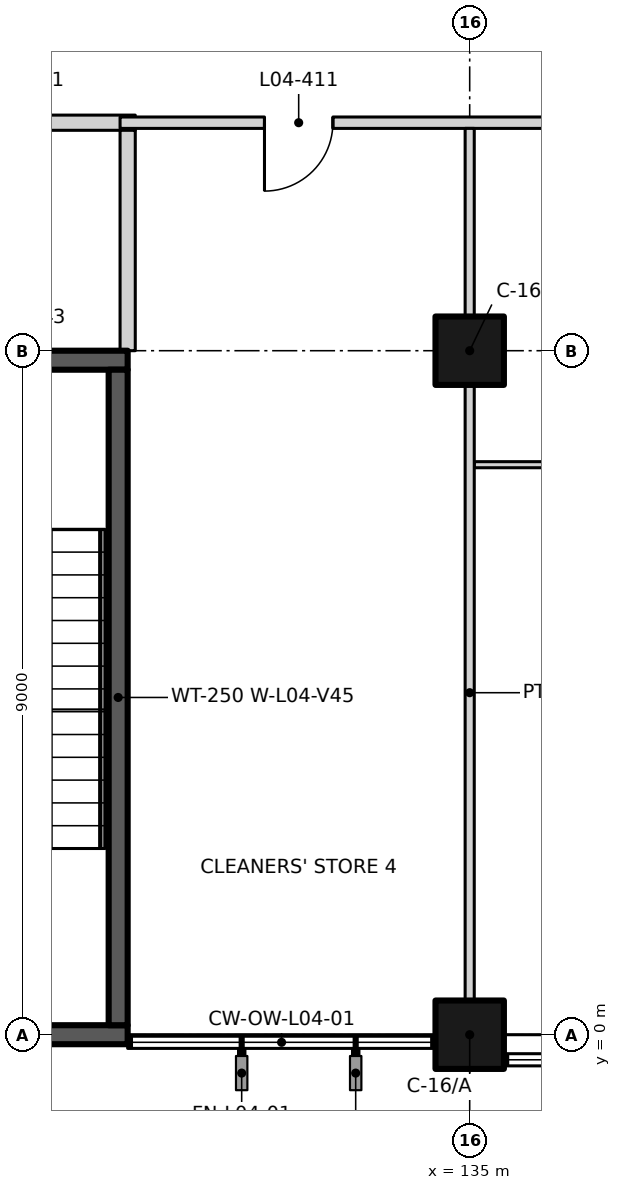
"""IFC4 building model, lengths in metres.
Left out: names, types, materials, properties, quantities, classifications, styles, units other than length and angle.
Written with IfcOpenShell. Run it as: python <this file> out.ifc"""

import sys

from ifc_helpers import new_model, si_unit, direction, frame, frame_2d, origin, origin_2d, place, context, subcontext, project, spatial, rectangle, extrude, element, fill, save


model = new_model("IFC4")
c1 = context("Model", 3, precision=1e-05, world=origin(), true_north=direction((0.0, 1.0)))
c2 = subcontext(c1, "Body", "Model", "MODEL_VIEW")
j1 = project(units=[si_unit("LENGTHUNIT", "METRE"), si_unit("PLANEANGLEUNIT", "RADIAN")], contexts=[c1])
p1 = place(None, origin())
s1 = spatial("IfcSite", under=j1, at=p1, CompositionType="ELEMENT")
p2 = place(p1, origin())
s2 = spatial("IfcBuilding", under=s1, at=p2, CompositionType="ELEMENT")
p3 = place(p2, frame((0.0, 0.0, 19.5)))
s3 = spatial("IfcBuildingStorey", under=s2, at=p3, CompositionType="ELEMENT", Elevation=19.5)
for number, where, z_axis, x_axis in (
    (1, (135.0, 0.0, 0.0), (0.0, 0.0, 1.0), (1.0, 0.0, 0.0)),
    (2, (135.0, 9.0, 0.0), (0.0, 0.0, 1.0), (1.0, 0.0, 0.0)),
):
    element("IfcColumn", number, at=place(p3, frame(where, z_axis=z_axis, x_axis=x_axis)), inside=s3, PredefinedType="COLUMN", context=c2, shape_type="SweptSolid", body=[
        extrude(rectangle(XDim=0.9, YDim=0.9, at=origin_2d()), origin(), (0.0, 0.0, 1.0), 4.5),
    ])
p4 = place(p3, frame((128.188, 0.0, 0.0), z_axis=(0.0, 0.0, 1.0), x_axis=(1.0, 0.0, 0.0)))
e3 = element("IfcWall", 3, at=p4, inside=s3, PredefinedType="SHEAR", context=c2, shape_type="SweptSolid", body=[
    extrude(rectangle(XDim=2.312, YDim=0.25, at=frame_2d((1.156, 0.0))), origin(), (0.0, 0.0, 1.0), 4.5),
])
p5 = place(p3, frame((126.45, 8.875, 0.0), z_axis=(0.0, 0.0, 1.0), x_axis=(1.0, 0.0, 0.0)))
e4 = element("IfcWall", 4, at=p5, inside=s3, PredefinedType="SHEAR", context=c2, shape_type="SweptSolid", body=[
    extrude(rectangle(XDim=4.05, YDim=0.25, at=frame_2d((2.025, 0.0))), origin(), (0.0, 0.0, 1.0), 4.5),
])
p6 = place(p5, frame((2.35, 0.0, 0.0), z_axis=(0.0, 0.0, 1.0), x_axis=(-1.0, 0.0, 0.0)))
e5 = element("IfcOpeningElement", 5, at=p6, cuts=e4, PredefinedType="OPENING", context=c2, shape_type="SweptSolid", body=[
    extrude(rectangle(XDim=1.1, YDim=2.1, at=frame_2d((0.55, 1.05))), frame((0.0, 0.135, 0.0), z_axis=(0.0, -1.0, 0.0), x_axis=(1.0, 0.0, 0.0)), (0.0, 0.0, 1.0), 0.27),
])
p7 = place(p3, frame((130.375, 0.125, 0.0), z_axis=(0.0, 0.0, 1.0), x_axis=(0.0, 1.0, 0.0)))
e6 = element("IfcWall", 6, at=p7, inside=s3, PredefinedType="SHEAR", context=c2, shape_type="SweptSolid", body=[
    extrude(rectangle(XDim=8.625, YDim=0.25, at=frame_2d((4.312, 0.0))), origin(), (0.0, 0.0, 1.0), 4.5),
])
p8 = place(p3, frame((135.06, 7.5, 0.0), z_axis=(0.0, 0.0, 1.0), x_axis=(1.0, 0.0, 0.0)))
e7 = element("IfcWall", 7, at=p8, inside=s3, PredefinedType="PARTITIONING", context=c2, shape_type="SweptSolid", body=[
    extrude(rectangle(XDim=8.88, YDim=0.08, at=frame_2d((4.44, 0.0))), origin(), (0.0, 0.0, 1.0), 4.2),
])
p9 = place(p8, frame((4.64, 0.0, 0.0), z_axis=(0.0, 0.0, 1.0), x_axis=(-1.0, 0.0, 0.0)))
e8 = element("IfcOpeningElement", 8, at=p9, cuts=e7, PredefinedType="OPENING", context=c2, shape_type="SweptSolid", body=[
    extrude(rectangle(XDim=0.9, YDim=2.1, at=frame_2d((0.45, 1.05))), frame((0.0, 0.05, 0.0), z_axis=(0.0, -1.0, 0.0), x_axis=(1.0, 0.0, 0.0)), (0.0, 0.0, 1.0), 0.1),
])
p10 = place(p8, frame((7.89, 0.0, 0.0), z_axis=(0.0, 0.0, 1.0), x_axis=(-1.0, 0.0, 0.0)))
e9 = element("IfcOpeningElement", 9, at=p10, cuts=e7, PredefinedType="OPENING", context=c2, shape_type="SweptSolid", body=[
    extrude(rectangle(XDim=0.9, YDim=2.1, at=frame_2d((0.45, 1.05))), frame((0.0, 0.05, 0.0), z_axis=(0.0, -1.0, 0.0), x_axis=(1.0, 0.0, 0.0)), (0.0, 0.0, 1.0), 0.1),
])
p11 = place(p3, frame((126.25, 12.0, 0.0), z_axis=(0.0, 0.0, 1.0), x_axis=(1.0, 0.0, 0.0)))
e10 = element("IfcWall", 10, at=p11, inside=s3, PredefinedType="PARTITIONING", context=c2, shape_type="SweptSolid", body=[
    extrude(rectangle(XDim=4.35, YDim=0.2, at=frame_2d((2.175, 0.0))), origin(), (0.0, 0.0, 1.0), 4.2),
])
p12 = place(p11, frame((2.6, 0.0, 0.0), z_axis=(0.0, 0.0, 1.0), x_axis=(-1.0, 0.0, 0.0)))
e11 = element("IfcOpeningElement", 11, at=p12, cuts=e10, PredefinedType="OPENING", context=c2, shape_type="SweptSolid", body=[
    extrude(rectangle(XDim=1.2, YDim=2.1, at=frame_2d((0.6, 1.05))), frame((0.0, 0.11, 0.0), z_axis=(0.0, -1.0, 0.0), x_axis=(1.0, 0.0, 0.0)), (0.0, 0.0, 1.0), 0.22),
])
p13 = place(p3, frame((130.4, 12.0, 0.0), z_axis=(0.0, 0.0, 1.0), x_axis=(1.0, 0.0, 0.0)))
e12 = element("IfcWall", 12, at=p13, inside=s3, PredefinedType="PARTITIONING", context=c2, shape_type="SweptSolid", body=[
    extrude(rectangle(XDim=13.6, YDim=0.15, at=frame_2d((6.8, 0.0))), origin(), (0.0, 0.0, 1.0), 4.2),
])
p14 = place(p13, frame((10.85, 0.0, 0.0), z_axis=(0.0, 0.0, 1.0), x_axis=(-1.0, 0.0, 0.0)))
e13 = element("IfcOpeningElement", 13, at=p14, cuts=e12, PredefinedType="OPENING", context=c2, shape_type="SweptSolid", body=[
    extrude(rectangle(XDim=1.0, YDim=2.1, at=frame_2d((0.5, 1.05))), frame((0.0, 0.085, 0.0), z_axis=(0.0, -1.0, 0.0), x_axis=(1.0, 0.0, 0.0)), (0.0, 0.0, 1.0), 0.17),
])
p15 = place(p13, frame((2.8, 0.0, 0.0), z_axis=(0.0, 0.0, 1.0), x_axis=(-1.0, 0.0, 0.0)))
e14 = element("IfcOpeningElement", 14, at=p15, cuts=e12, PredefinedType="OPENING", context=c2, shape_type="SweptSolid", body=[
    extrude(rectangle(XDim=0.9, YDim=2.1, at=frame_2d((0.45, 1.05))), frame((0.0, 0.085, 0.0), z_axis=(0.0, -1.0, 0.0), x_axis=(1.0, 0.0, 0.0)), (0.0, 0.0, 1.0), 0.17),
])
p16 = place(p3, frame((130.5, 9.0, 0.0), z_axis=(0.0, 0.0, 1.0), x_axis=(0.0, 1.0, 0.0)))
e15 = element("IfcWall", 15, at=p16, inside=s3, PredefinedType="PARTITIONING", context=c2, shape_type="SweptSolid", body=[
    extrude(rectangle(XDim=2.9, YDim=0.2, at=frame_2d((1.45, 0.0))), origin(), (0.0, 0.0, 1.0), 4.2),
])
p17 = place(p3, frame((135.0, 0.45, 0.0), z_axis=(0.0, 0.0, 1.0), x_axis=(0.0, 1.0, 0.0)))
e16 = element("IfcWall", 16, at=p17, inside=s3, PredefinedType="PARTITIONING", context=c2, shape_type="SweptSolid", body=[
    extrude(rectangle(XDim=8.1, YDim=0.12, at=frame_2d((4.05, 0.0))), origin(), (0.0, 0.0, 1.0), 4.2),
])
p18 = place(p3, frame((135.0, 9.45, 0.0), z_axis=(0.0, 0.0, 1.0), x_axis=(0.0, 1.0, 0.0)))
e17 = element("IfcWall", 17, at=p18, inside=s3, PredefinedType="PARTITIONING", context=c2, shape_type="SweptSolid", body=[
    extrude(rectangle(XDim=2.475, YDim=0.12, at=frame_2d((1.238, 0.0))), origin(), (0.0, 0.0, 1.0), 4.2),
])
p19 = place(p15, origin())
e18 = element("IfcDoor", 18, at=p19, inside=s3, OperationType="SINGLE_SWING_RIGHT", PredefinedType="DOOR", context=c2, shape_type="SweptSolid", body=[
    extrude(rectangle(XDim=0.9, YDim=2.1, at=frame_2d((0.45, 1.05))), frame((0.0, 0.025, 0.0), z_axis=(0.0, -1.0, 0.0), x_axis=(1.0, 0.0, 0.0)), (0.0, 0.0, 1.0), 0.05),
])
fill(e14, e18)
save(model, sys.argv[1])
